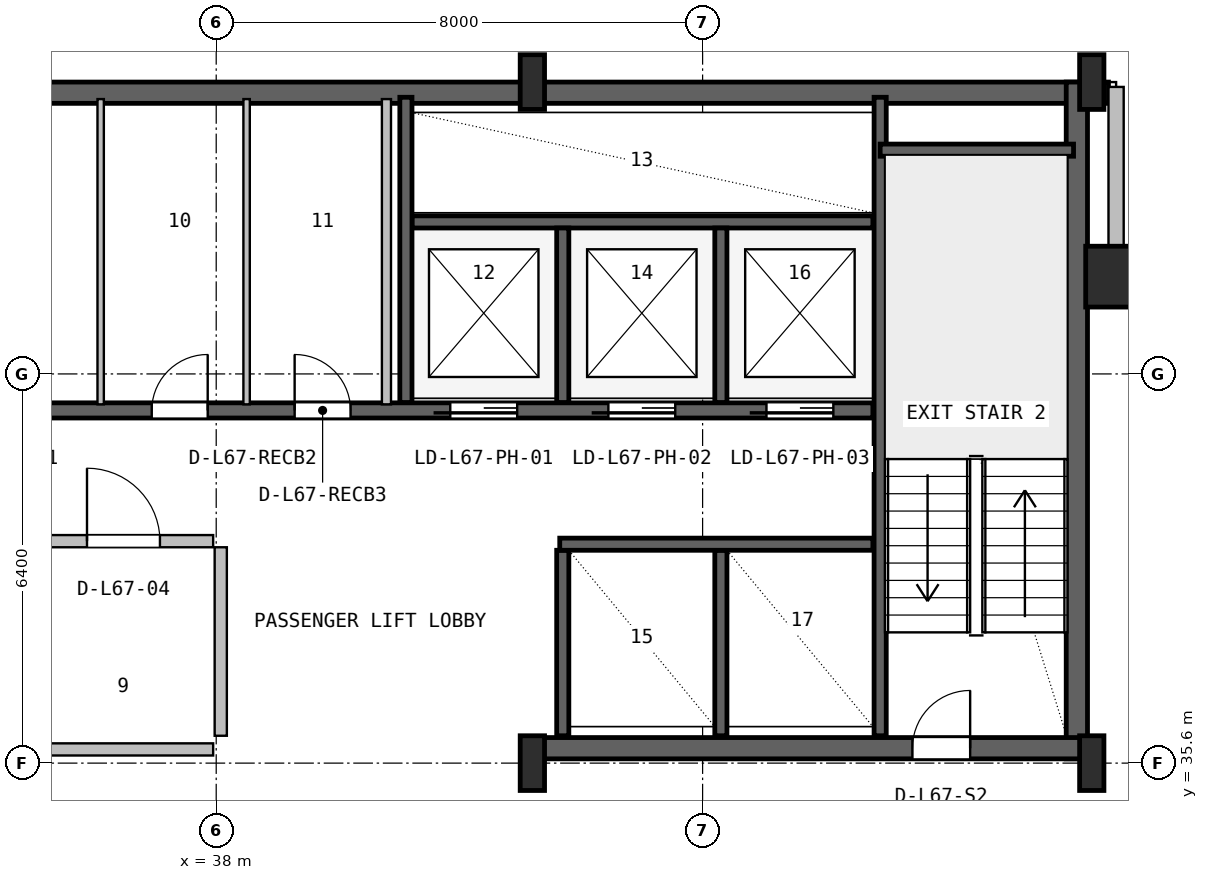
"""IFC4 building model, lengths in metres.
Left out: names, types, materials, properties, quantities, classifications, styles, units other than length and angle.
Written with IfcOpenShell. Run it as: python <this file> out.ifc"""

import sys

from ifc_helpers import new_model, si_unit, direction, frame, frame_2d, origin, origin_2d, place, context, subcontext, project, spatial, rectangle, hollow_rectangle, i_section, extrude, source, transform, mapped, element, fill, save


model = new_model("IFC4")
c1 = context("Model", 3, precision=1e-05, world=origin(), true_north=direction((0.0, 1.0)))
c2 = subcontext(c1, "Body", "Model", "MODEL_VIEW")
j1 = project(units=[si_unit("LENGTHUNIT", "METRE"), si_unit("PLANEANGLEUNIT", "RADIAN")], contexts=[c1])
p1 = place(None, origin())
s1 = spatial("IfcSite", under=j1, at=p1, CompositionType="ELEMENT")
p2 = place(p1, origin())
s2 = spatial("IfcBuilding", under=s1, at=p2, CompositionType="ELEMENT")
p3 = place(p2, frame((0.0, 0.0, 269.8)))
s3 = spatial("IfcBuildingStorey", under=s2, at=p3, CompositionType="ELEMENT", Elevation=269.8)
p4 = place(p3, frame((15.325, 46.625, 0.0), z_axis=(0.0, 0.0, 1.0), x_axis=(1.0, 0.0, 0.0)))
e1 = element("IfcWall", 1, at=p4, inside=s3, PredefinedType="SHEAR", context=c2, shape_type="SweptSolid", body=[
    extrude(rectangle(XDim=37.35, YDim=0.35, at=frame_2d((18.675, 0.0))), origin(), (0.0, 0.0, 1.0), 3.55),
])
p5 = place(p3, frame((52.155, 35.67, 0.0), z_axis=(0.0, 0.0, 1.0), x_axis=(0.0, 1.0, 0.0)))
e2 = element("IfcWall", 2, at=p5, inside=s3, PredefinedType="SHEAR", context=c2, shape_type="SweptSolid", body=[
    extrude(rectangle(XDim=11.13, YDim=0.35, at=frame_2d((5.565, 0.0))), origin(), (0.0, 0.0, 1.0), 3.55),
])
p6 = place(p3, frame((43.2, 35.845, 0.0), z_axis=(0.0, 0.0, 1.0), x_axis=(1.0, 0.0, 0.0)))
e3 = element("IfcWall", 3, at=p6, inside=s3, PredefinedType="SHEAR", context=c2, shape_type="SweptSolid", body=[
    extrude(rectangle(XDim=9.13, YDim=0.35, at=frame_2d((4.565, 0.0))), origin(), (0.0, 0.0, 1.0), 3.55),
])
p7 = place(p6, frame((6.25, 0.0, 0.0)))
e4 = element("IfcOpeningElement", 4, at=p7, cuts=e3, PredefinedType="OPENING", context=c2, shape_type="SweptSolid", body=[
    extrude(rectangle(XDim=0.95, YDim=2.1, at=frame_2d((0.475, 1.05))), frame((0.0, 0.185, 0.0), z_axis=(0.0, -1.0, 0.0), x_axis=(1.0, 0.0, 0.0)), (0.0, 0.0, 1.0), 0.37),
])
m1 = source(origin(), c2, "Body", "SweptSolid", [
    extrude(i_section(OverallWidth=0.4, OverallDepth=0.9, WebThickness=0.016, FlangeThickness=0.028, FilletRadius=0.016, at=origin_2d()), origin(), (0.0, 0.0, 1.0), 3.8),
])
for number, where, z_axis, x_axis in (
    (5, (43.2, 35.6, 0.0), (0.0, 0.0, 1.0), (1.0, 0.0, 0.0)),
    (6, (43.2, 46.8, 0.0), (0.0, 0.0, 1.0), (1.0, 0.0, 0.0)),
    (7, (52.4, 35.6, 0.0), (0.0, 0.0, 1.0), (1.0, 0.0, 0.0)),
    (8, (52.4, 46.8, 0.0), (0.0, 0.0, 1.0), (1.0, 0.0, 0.0)),
):
    element("IfcColumn", number, at=place(p3, frame(where, z_axis=z_axis, x_axis=x_axis)), inside=s3, PredefinedType="COLUMN", context=c2, shape_type="MappedRepresentation", body=[
        mapped(m1, transform((0.0, 0.0, 0.0), x_axis=(1.0, 0.0, 0.0), y_axis=(0.0, 1.0, 0.0), z_axis=(0.0, 0.0, 1.0), scale=1.0)),
    ])
m2 = source(origin(), c2, "Body", "SweptSolid", [
    extrude(hollow_rectangle(XDim=1.0, YDim=1.0, WallThickness=0.04, at=origin_2d()), origin(), (0.0, 0.0, 1.0), 3.8),
])
p8 = place(p3, frame((52.8, 43.6, 0.0), z_axis=(0.0, 0.0, 1.0), x_axis=(1.0, 0.0, 0.0)))
e9 = element("IfcColumn", 9, at=p8, inside=s3, PredefinedType="COLUMN", context=c2, shape_type="MappedRepresentation", body=[
    mapped(m2, transform((0.0, 0.0, 0.0), x_axis=(1.0, 0.0, 0.0), y_axis=(0.0, 1.0, 0.0), z_axis=(0.0, 0.0, 1.0), scale=1.0)),
])
p9 = place(p3, frame((52.93, 43.6, 0.0), z_axis=(0.0, 0.0, 1.0), x_axis=(1.0, 0.0, 0.0)))
e10 = element("IfcWall", 10, at=p9, inside=s3, PredefinedType="SOLIDWALL", context=c2, shape_type="SweptSolid", body=[
    extrude(rectangle(XDim=2.99, YDim=0.25, at=frame_2d((1.495, 0.0))), origin(), (0.0, 0.0, 1.0), 3.53),
])
p10 = place(p3, frame((52.8, 43.52, 0.0), z_axis=(0.0, 0.0, 1.0), x_axis=(0.0, 1.0, 0.0)))
e11 = element("IfcWall", 11, at=p10, inside=s3, PredefinedType="SOLIDWALL", context=c2, shape_type="SweptSolid", body=[
    extrude(rectangle(XDim=3.2, YDim=0.25, at=frame_2d((1.6, 0.0))), origin(), (0.0, 0.0, 1.0), 3.171),
])
p11 = place(p3, frame((48.92, 36.05, 0.0), z_axis=(0.0, 0.0, 1.0), x_axis=(0.0, 1.0, 0.0)))
e12 = element("IfcWall", 12, at=p11, inside=s3, PredefinedType="SHEAR", context=c2, shape_type="SweptSolid", body=[
    extrude(rectangle(XDim=10.5, YDim=0.2, at=frame_2d((5.25, 0.0))), origin(), (0.0, 0.0, 1.0), 3.55),
])
p12 = place(p3, frame((48.92, 45.68, 0.0), z_axis=(0.0, 0.0, 1.0), x_axis=(1.0, 0.0, 0.0)))
e13 = element("IfcWall", 13, at=p12, inside=s3, PredefinedType="SHEAR", context=c2, shape_type="SweptSolid", body=[
    extrude(rectangle(XDim=3.18, YDim=0.2, at=frame_2d((1.59, 0.0))), origin(), (0.0, 0.0, 1.0), 3.55),
])
p13 = place(p3, frame((24.98, 41.4, 0.0), z_axis=(0.0, 0.0, 1.0), x_axis=(1.0, 0.0, 0.0)))
e14 = element("IfcWall", 14, at=p13, inside=s3, PredefinedType="SHEAR", context=c2, shape_type="SweptSolid", body=[
    extrude(rectangle(XDim=23.82, YDim=0.25, at=frame_2d((11.91, 0.0))), origin(), (0.0, 0.0, 1.0), 3.55),
])
p14 = place(p13, frame((16.87, 0.0, 0.0)))
e15 = element("IfcOpeningElement", 15, at=p14, cuts=e14, PredefinedType="OPENING", context=c2, shape_type="SweptSolid", body=[
    extrude(rectangle(XDim=1.1, YDim=2.18, at=frame_2d((0.55, 1.09))), frame((0.0, 0.135, 0.0), z_axis=(0.0, -1.0, 0.0), x_axis=(1.0, 0.0, 0.0)), (0.0, 0.0, 1.0), 0.27),
])
p15 = place(p13, frame((19.47, 0.0, 0.0)))
e16 = element("IfcOpeningElement", 16, at=p15, cuts=e14, PredefinedType="OPENING", context=c2, shape_type="SweptSolid", body=[
    extrude(rectangle(XDim=1.1, YDim=2.18, at=frame_2d((0.55, 1.09))), frame((0.0, 0.135, 0.0), z_axis=(0.0, -1.0, 0.0), x_axis=(1.0, 0.0, 0.0)), (0.0, 0.0, 1.0), 0.27),
])
p16 = place(p13, frame((22.07, 0.0, 0.0)))
e17 = element("IfcOpeningElement", 17, at=p16, cuts=e14, PredefinedType="OPENING", context=c2, shape_type="SweptSolid", body=[
    extrude(rectangle(XDim=1.1, YDim=2.18, at=frame_2d((0.55, 1.09))), frame((0.0, 0.135, 0.0), z_axis=(0.0, -1.0, 0.0), x_axis=(1.0, 0.0, 0.0)), (0.0, 0.0, 1.0), 0.27),
])
p17 = place(p13, frame((1.81, 0.0, 0.0)))
e18 = element("IfcOpeningElement", 18, at=p17, cuts=e14, PredefinedType="OPENING", context=c2, shape_type="SweptSolid", body=[
    extrude(rectangle(XDim=0.92, YDim=2.08, at=frame_2d((0.46, 1.04))), frame((0.0, 0.135, 0.0), z_axis=(0.0, -1.0, 0.0), x_axis=(1.0, 0.0, 0.0)), (0.0, 0.0, 1.0), 0.27),
])
p18 = place(p13, frame((5.71, 0.0, 0.0)))
e19 = element("IfcOpeningElement", 19, at=p18, cuts=e14, PredefinedType="OPENING", context=c2, shape_type="SweptSolid", body=[
    extrude(rectangle(XDim=0.92, YDim=2.08, at=frame_2d((0.46, 1.04))), frame((0.0, 0.135, 0.0), z_axis=(0.0, -1.0, 0.0), x_axis=(1.0, 0.0, 0.0)), (0.0, 0.0, 1.0), 0.27),
])
p19 = place(p13, frame((9.21, 0.0, 0.0)))
e20 = element("IfcOpeningElement", 20, at=p19, cuts=e14, PredefinedType="OPENING", context=c2, shape_type="SweptSolid", body=[
    extrude(rectangle(XDim=0.92, YDim=2.08, at=frame_2d((0.46, 1.04))), frame((0.0, 0.135, 0.0), z_axis=(0.0, -1.0, 0.0), x_axis=(1.0, 0.0, 0.0)), (0.0, 0.0, 1.0), 0.27),
])
p20 = place(p13, frame((11.96, 0.0, 0.0)))
e21 = element("IfcOpeningElement", 21, at=p20, cuts=e14, PredefinedType="OPENING", context=c2, shape_type="SweptSolid", body=[
    extrude(rectangle(XDim=0.92, YDim=2.08, at=frame_2d((0.46, 1.04))), frame((0.0, 0.135, 0.0), z_axis=(0.0, -1.0, 0.0), x_axis=(1.0, 0.0, 0.0)), (0.0, 0.0, 1.0), 0.27),
])
p21 = place(p13, frame((14.31, 0.0, 0.0)))
e22 = element("IfcOpeningElement", 22, at=p21, cuts=e14, PredefinedType="OPENING", context=c2, shape_type="SweptSolid", body=[
    extrude(rectangle(XDim=0.92, YDim=2.08, at=frame_2d((0.46, 1.04))), frame((0.0, 0.135, 0.0), z_axis=(0.0, -1.0, 0.0), x_axis=(1.0, 0.0, 0.0)), (0.0, 0.0, 1.0), 0.27),
])
p22 = place(p3, frame((41.22, 44.5, 0.0), z_axis=(0.0, 0.0, 1.0), x_axis=(1.0, 0.0, 0.0)))
e23 = element("IfcWall", 23, at=p22, inside=s3, PredefinedType="SHEAR", context=c2, shape_type="SweptSolid", body=[
    extrude(rectangle(XDim=7.58, YDim=0.2, at=frame_2d((3.79, 0.0))), origin(), (0.0, 0.0, 1.0), 3.55),
])
p23 = place(p3, frame((41.12, 41.53, 0.0), z_axis=(0.0, 0.0, 1.0), x_axis=(0.0, 1.0, 0.0)))
e24 = element("IfcWall", 24, at=p23, inside=s3, PredefinedType="SHEAR", context=c2, shape_type="SweptSolid", body=[
    extrude(rectangle(XDim=5.02, YDim=0.2, at=frame_2d((2.51, 0.0))), origin(), (0.0, 0.0, 1.0), 3.55),
])
for number, where, z_axis, x_axis in (
    (25, (43.7, 41.53, 0.0), (0.0, 0.0, 1.0), (0.0, 1.0, 0.0)),
    (26, (46.3, 41.53, 0.0), (0.0, 0.0, 1.0), (0.0, 1.0, 0.0)),
):
    element("IfcWall", number, at=place(p3, frame(where, z_axis=z_axis, x_axis=x_axis)), inside=s3, PredefinedType="SHEAR", context=c2, shape_type="SweptSolid", body=[
        extrude(rectangle(XDim=2.87, YDim=0.2, at=frame_2d((1.435, 0.0))), origin(), (0.0, 0.0, 1.0), 3.55),
    ])
for number, where, z_axis, x_axis in (
    (27, (43.7, 36.05, 0.0), (0.0, 0.0, 1.0), (0.0, 1.0, 0.0)),
    (28, (46.3, 36.05, 0.0), (0.0, 0.0, 1.0), (0.0, 1.0, 0.0)),
):
    element("IfcWall", number, at=place(p3, frame(where, z_axis=z_axis, x_axis=x_axis)), inside=s3, PredefinedType="SHEAR", context=c2, shape_type="SweptSolid", body=[
        extrude(rectangle(XDim=3.05, YDim=0.2, at=frame_2d((1.525, 0.0))), origin(), (0.0, 0.0, 1.0), 3.55),
    ])
p24 = place(p3, frame((43.65, 39.2, 0.0), z_axis=(0.0, 0.0, 1.0), x_axis=(1.0, 0.0, 0.0)))
e29 = element("IfcWall", 29, at=p24, inside=s3, PredefinedType="SHEAR", context=c2, shape_type="SweptSolid", body=[
    extrude(rectangle(XDim=5.15, YDim=0.2, at=frame_2d((2.575, 0.0))), origin(), (0.0, 0.0, 1.0), 3.55),
])
p25 = place(p3, frame((25.0, 35.825, 0.0), z_axis=(0.0, 0.0, 1.0), x_axis=(1.0, 0.0, 0.0)))
e30 = element("IfcWall", 30, at=p25, inside=s3, PredefinedType="SOLIDWALL", context=c2, shape_type="SweptSolid", body=[
    extrude(rectangle(XDim=12.95, YDim=0.2, at=frame_2d((6.475, 0.0))), origin(), (0.0, 0.0, 1.0), 2.575),
])
p26 = place(p3, frame((25.0, 39.25, 0.0), z_axis=(0.0, 0.0, 1.0), x_axis=(1.0, 0.0, 0.0)))
e31 = element("IfcWall", 31, at=p26, inside=s3, PredefinedType="SOLIDWALL", context=c2, shape_type="SweptSolid", body=[
    extrude(rectangle(XDim=12.95, YDim=0.2, at=frame_2d((6.475, 0.0))), origin(), (0.0, 0.0, 1.0), 3.53),
])
p27 = place(p26, frame((1.1, 0.0, 0.0)))
e32 = element("IfcOpeningElement", 32, at=p27, cuts=e31, PredefinedType="OPENING", context=c2, shape_type="SweptSolid", body=[
    extrude(rectangle(XDim=0.9, YDim=2.06, at=frame_2d((0.45, 1.03))), frame((0.0, 0.11, 0.0), z_axis=(0.0, -1.0, 0.0), x_axis=(1.0, 0.0, 0.0)), (0.0, 0.0, 1.0), 0.22),
])
p28 = place(p26, frame((4.5, 0.0, 0.0)))
e33 = element("IfcOpeningElement", 33, at=p28, cuts=e31, PredefinedType="OPENING", context=c2, shape_type="SweptSolid", body=[
    extrude(rectangle(XDim=0.9, YDim=2.06, at=frame_2d((0.45, 1.03))), frame((0.0, 0.11, 0.0), z_axis=(0.0, -1.0, 0.0), x_axis=(1.0, 0.0, 0.0)), (0.0, 0.0, 1.0), 0.22),
])
p29 = place(p26, frame((7.84, 0.0, 0.0)))
e34 = element("IfcOpeningElement", 34, at=p29, cuts=e31, PredefinedType="OPENING", context=c2, shape_type="SweptSolid", body=[
    extrude(rectangle(XDim=0.92, YDim=2.08, at=frame_2d((0.46, 1.04))), frame((0.0, 0.11, 0.0), z_axis=(0.0, -1.0, 0.0), x_axis=(1.0, 0.0, 0.0)), (0.0, 0.0, 1.0), 0.22),
])
p30 = place(p26, frame((10.875, 0.0, 0.0)))
e35 = element("IfcOpeningElement", 35, at=p30, cuts=e31, PredefinedType="OPENING", context=c2, shape_type="SweptSolid", body=[
    extrude(rectangle(XDim=1.2, YDim=2.1, at=frame_2d((0.6, 1.05))), frame((0.0, 0.11, 0.0), z_axis=(0.0, -1.0, 0.0), x_axis=(1.0, 0.0, 0.0)), (0.0, 0.0, 1.0), 0.22),
])
p31 = place(p3, frame((38.075, 36.05, 0.0), z_axis=(0.0, 0.0, 1.0), x_axis=(0.0, 1.0, 0.0)))
e36 = element("IfcWall", 36, at=p31, inside=s3, PredefinedType="SOLIDWALL", context=c2, shape_type="SweptSolid", body=[
    extrude(rectangle(XDim=3.1, YDim=0.2, at=frame_2d((1.55, 0.0))), origin(), (0.0, 0.0, 1.0), 3.53),
])
for number, where, z_axis, x_axis in (
    (37, (36.1, 41.5, 0.0), (0.0, 0.0, 1.0), (0.0, 1.0, 0.0)),
    (38, (38.5, 41.5, 0.0), (0.0, 0.0, 1.0), (0.0, 1.0, 0.0)),
):
    element("IfcWall", number, at=place(p3, frame(where, z_axis=z_axis, x_axis=x_axis)), inside=s3, PredefinedType="PARTITIONING", context=c2, shape_type="SweptSolid", body=[
        extrude(rectangle(XDim=5.02, YDim=0.105, at=frame_2d((2.51, 0.0))), origin(), (0.0, 0.0, 1.0), 3.53),
    ])
p32 = place(p3, frame((40.8, 41.5, 0.0), z_axis=(0.0, 0.0, 1.0), x_axis=(0.0, 1.0, 0.0)))
e39 = element("IfcWall", 39, at=p32, inside=s3, PredefinedType="PARTITIONING", context=c2, shape_type="SweptSolid", body=[
    extrude(rectangle(XDim=5.02, YDim=0.15, at=frame_2d((2.51, 0.0))), origin(), (0.0, 0.0, 1.0), 3.53),
])
m3 = source(origin(), c2, "Body", "SweptSolid", [
    extrude(rectangle(XDim=0.95, YDim=2.1, at=frame_2d((0.475, 1.05))), frame((0.0, 0.025, 0.0), z_axis=(0.0, -1.0, 0.0), x_axis=(1.0, 0.0, 0.0)), (0.0, 0.0, 1.0), 0.05),
])
p33 = place(p7, origin())
e40 = element("IfcDoor", 40, at=p33, inside=s3, OperationType="SINGLE_SWING_RIGHT", PredefinedType="DOOR", context=c2, shape_type="MappedRepresentation", body=[
    mapped(m3, transform((0.0, 0.0, 0.0), x_axis=(1.0, 0.0, 0.0), y_axis=(0.0, 1.0, 0.0), z_axis=(0.0, 0.0, 1.0), scale=1.0)),
])
fill(e4, e40)
m4 = source(origin(), c2, "Body", "SweptSolid", [
    extrude(rectangle(XDim=1.1, YDim=2.18, at=frame_2d((0.55, 1.09))), frame((0.0, 0.025, 0.0), z_axis=(0.0, -1.0, 0.0), x_axis=(1.0, 0.0, 0.0)), (0.0, 0.0, 1.0), 0.05),
])
p34 = place(p14, frame((1.1, 0.0, 0.0), z_axis=(0.0, 0.0, 1.0), x_axis=(-1.0, 0.0, 0.0)))
e41 = element("IfcDoor", 41, at=p34, inside=s3, OperationType="SLIDING_TO_LEFT", PredefinedType="DOOR", context=c2, shape_type="MappedRepresentation", body=[
    mapped(m4, transform((0.0, 0.0, 0.0), x_axis=(1.0, 0.0, 0.0), y_axis=(0.0, 1.0, 0.0), z_axis=(0.0, 0.0, 1.0), scale=1.0)),
])
fill(e15, e41)
p35 = place(p15, frame((1.1, 0.0, 0.0), z_axis=(0.0, 0.0, 1.0), x_axis=(-1.0, 0.0, 0.0)))
e42 = element("IfcDoor", 42, at=p35, inside=s3, OperationType="SLIDING_TO_LEFT", PredefinedType="DOOR", context=c2, shape_type="MappedRepresentation", body=[
    mapped(m4, transform((0.0, 0.0, 0.0), x_axis=(1.0, 0.0, 0.0), y_axis=(0.0, 1.0, 0.0), z_axis=(0.0, 0.0, 1.0), scale=1.0)),
])
fill(e16, e42)
p36 = place(p16, frame((1.1, 0.0, 0.0), z_axis=(0.0, 0.0, 1.0), x_axis=(-1.0, 0.0, 0.0)))
e43 = element("IfcDoor", 43, at=p36, inside=s3, OperationType="SLIDING_TO_LEFT", PredefinedType="DOOR", context=c2, shape_type="MappedRepresentation", body=[
    mapped(m4, transform((0.0, 0.0, 0.0), x_axis=(1.0, 0.0, 0.0), y_axis=(0.0, 1.0, 0.0), z_axis=(0.0, 0.0, 1.0), scale=1.0)),
])
fill(e17, e43)
m5 = source(origin(), c2, "Body", "SweptSolid", [
    extrude(rectangle(XDim=0.92, YDim=2.08, at=frame_2d((0.46, 1.04))), frame((0.0, 0.025, 0.0), z_axis=(0.0, -1.0, 0.0), x_axis=(1.0, 0.0, 0.0)), (0.0, 0.0, 1.0), 0.05),
])
p37 = place(p20, origin())
e44 = element("IfcDoor", 44, at=p37, inside=s3, OperationType="SINGLE_SWING_RIGHT", PredefinedType="DOOR", context=c2, shape_type="MappedRepresentation", body=[
    mapped(m5, transform((0.0, 0.0, 0.0), x_axis=(1.0, 0.0, 0.0), y_axis=(0.0, 1.0, 0.0), z_axis=(0.0, 0.0, 1.0), scale=1.0)),
])
fill(e21, e44)
p38 = place(p21, origin())
e45 = element("IfcDoor", 45, at=p38, inside=s3, OperationType="SINGLE_SWING_LEFT", PredefinedType="DOOR", context=c2, shape_type="MappedRepresentation", body=[
    mapped(m5, transform((0.0, 0.0, 0.0), x_axis=(1.0, 0.0, 0.0), y_axis=(0.0, 1.0, 0.0), z_axis=(0.0, 0.0, 1.0), scale=1.0)),
])
fill(e22, e45)
m6 = source(origin(), c2, "Body", "SweptSolid", [
    extrude(rectangle(XDim=1.2, YDim=2.1, at=frame_2d((0.6, 1.05))), frame((0.0, 0.025, 0.0), z_axis=(0.0, -1.0, 0.0), x_axis=(1.0, 0.0, 0.0)), (0.0, 0.0, 1.0), 0.05),
])
p39 = place(p30, origin())
e46 = element("IfcDoor", 46, at=p39, inside=s3, OperationType="SINGLE_SWING_LEFT", PredefinedType="DOOR", context=c2, shape_type="MappedRepresentation", body=[
    mapped(m6, transform((0.0, 0.0, 0.0), x_axis=(1.0, 0.0, 0.0), y_axis=(0.0, 1.0, 0.0), z_axis=(0.0, 0.0, 1.0), scale=1.0)),
])
fill(e35, e46)
save(model, sys.argv[1])
